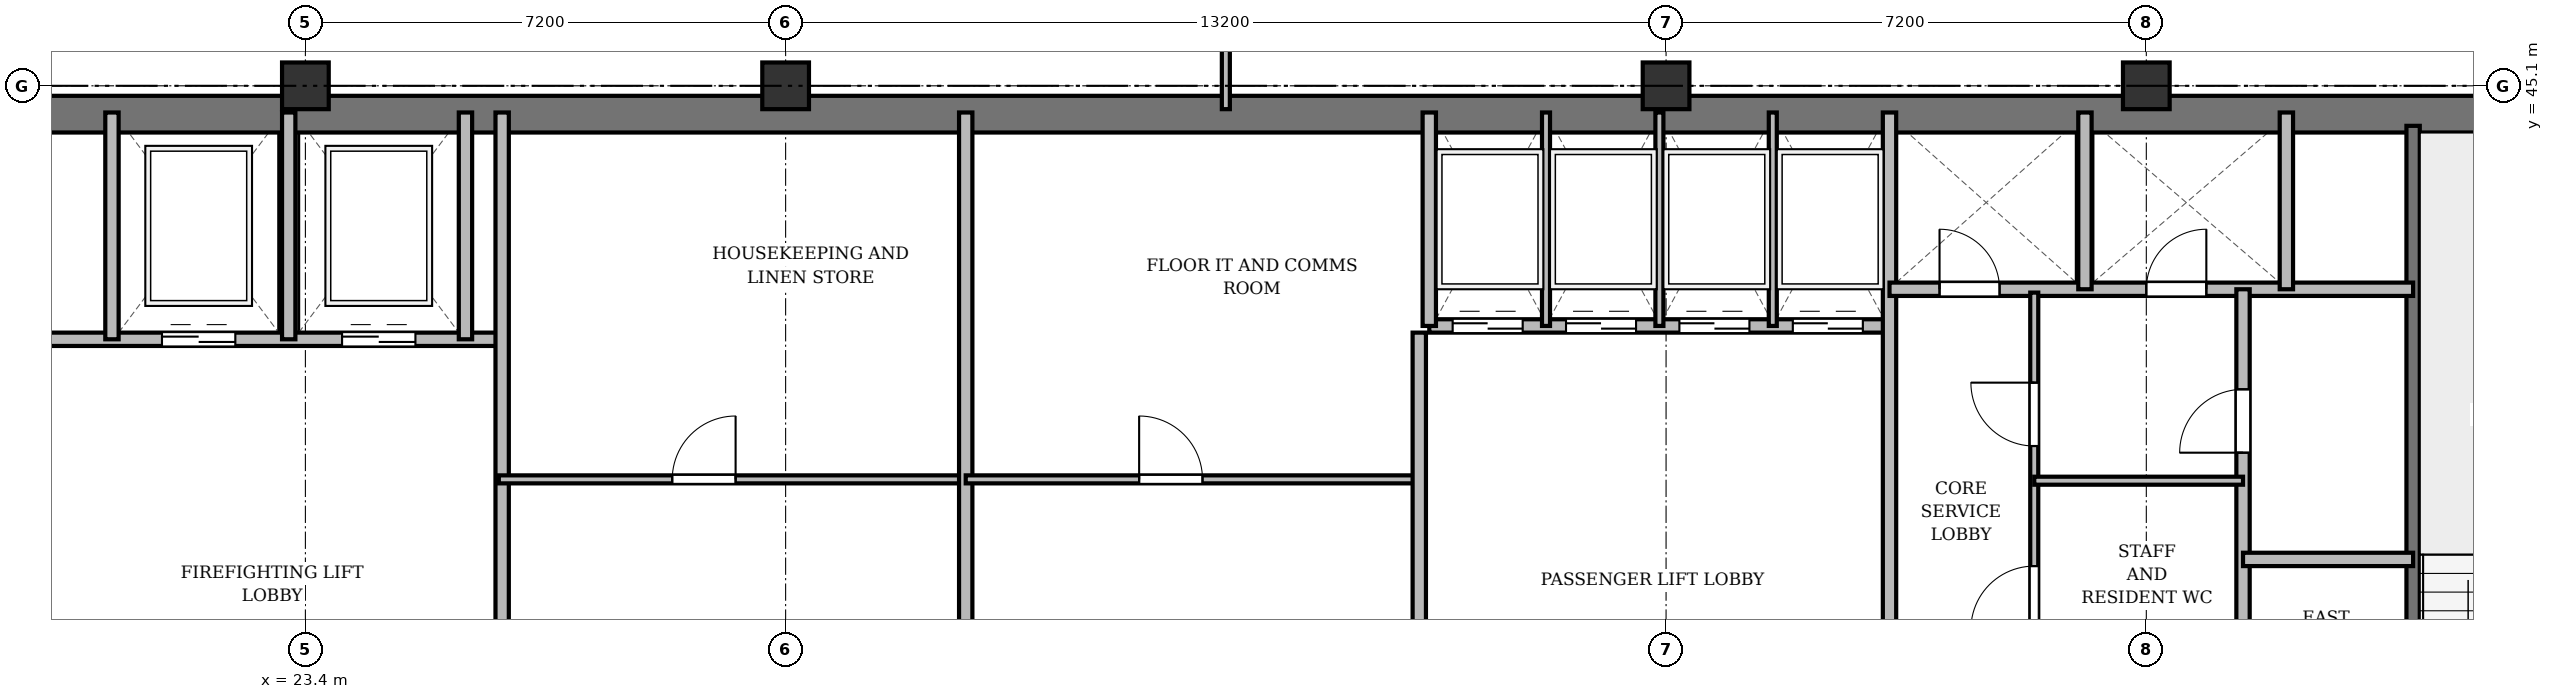
"""IFC4 building model, lengths in metres.
Left out: names, types, materials, properties, quantities, classifications, styles, units other than length and angle.
Written with IfcOpenShell. Run it as: python <this file> out.ifc"""

import sys

from ifc_helpers import new_model, si_unit, direction, frame, frame_2d, origin, origin_2d, place, context, subcontext, project, spatial, rectangle, extrude, source, transform, mapped, element, fill, save


model = new_model("IFC4")
c1 = context("Model", 3, precision=1e-05, world=origin(), true_north=direction((0.0, 1.0)))
c2 = subcontext(c1, "Body", "Model", "MODEL_VIEW")
j1 = project(units=[si_unit("LENGTHUNIT", "METRE"), si_unit("PLANEANGLEUNIT", "RADIAN")], contexts=[c1])
p1 = place(None, origin())
s1 = spatial("IfcSite", under=j1, at=p1, CompositionType="ELEMENT")
p2 = place(p1, origin())
s2 = spatial("IfcBuilding", under=s1, at=p2, CompositionType="ELEMENT")
p3 = place(p2, frame((0.0, 0.0, 222.9)))
s3 = spatial("IfcBuildingStorey", under=s2, at=p3, CompositionType="ELEMENT", Elevation=222.9)
m1 = source(origin(), c2, "Body", "SweptSolid", [
    extrude(rectangle(XDim=0.7, YDim=0.7, at=origin_2d()), origin(), (0.0, 0.0, 1.0), 3.6),
])
for number, where, z_axis, x_axis in (
    (1, (23.4, 45.1, 0.0), (0.0, 0.0, 1.0), (1.0, 0.0, 0.0)),
    (2, (30.6, 45.1, 0.0), (0.0, 0.0, 1.0), (1.0, 0.0, 0.0)),
    (3, (43.8, 45.1, 0.0), (0.0, 0.0, 1.0), (1.0, 0.0, 0.0)),
    (4, (51.0, 45.1, 0.0), (0.0, 0.0, 1.0), (1.0, 0.0, 0.0)),
):
    element("IfcColumn", number, at=place(p3, frame(where, z_axis=z_axis, x_axis=x_axis)), inside=s3, PredefinedType="COLUMN", context=c2, shape_type="MappedRepresentation", body=[
        mapped(m1, transform((0.0, 0.0, 0.0), x_axis=(1.0, 0.0, 0.0), y_axis=(0.0, 1.0, 0.0), z_axis=(0.0, 0.0, 1.0), scale=1.0)),
    ])
p4 = place(p3, frame((15.65, 44.675, 0.0), z_axis=(0.0, 0.0, 1.0), x_axis=(1.0, 0.0, 0.0)))
e5 = element("IfcWall", 5, at=p4, inside=s3, PredefinedType="SHEAR", context=c2, shape_type="SweptSolid", body=[
    extrude(rectangle(XDim=43.1, YDim=0.55, at=frame_2d((21.55, 0.0))), origin(), (0.0, 0.0, 1.0), 3.36),
])
p5 = place(p3, frame((55.0, 33.4, 0.0), z_axis=(0.0, 0.0, 1.0), x_axis=(0.0, 1.0, 0.0)))
e6 = element("IfcWall", 6, at=p5, inside=s3, PredefinedType="SHEAR", context=c2, shape_type="SweptSolid", body=[
    extrude(rectangle(XDim=11.1, YDim=0.2, at=frame_2d((5.55, 0.0))), origin(), (0.0, 0.0, 1.0), 3.36),
])
p6 = place(p5, frame((0.85, 0.0, 0.0)))
e7 = element("IfcOpeningElement", 7, at=p6, cuts=e6, PredefinedType="OPENING", context=c2, shape_type="SweptSolid", body=[
    extrude(rectangle(XDim=1.1, YDim=2.15, at=frame_2d((0.55, 1.075))), frame((0.0, 0.11, 0.0), z_axis=(0.0, -1.0, 0.0), x_axis=(1.0, 0.0, 0.0)), (0.0, 0.0, 1.0), 0.22),
])
p7 = place(p3, frame((19.55, 41.3, 0.0), z_axis=(0.0, 0.0, 1.0), x_axis=(1.0, 0.0, 0.0)))
e8 = element("IfcWall", 8, at=p7, inside=s3, PredefinedType="SOLIDWALL", context=c2, shape_type="SweptSolid", body=[
    extrude(rectangle(XDim=6.75, YDim=0.2, at=frame_2d((3.375, 0.0))), origin(), (0.0, 0.0, 1.0), 3.36),
])
p8 = place(p7, frame((1.7, 0.0, 0.0)))
e9 = element("IfcOpeningElement", 9, at=p8, cuts=e8, PredefinedType="OPENING", context=c2, shape_type="SweptSolid", body=[
    extrude(rectangle(XDim=1.1, YDim=2.15, at=frame_2d((0.55, 1.075))), frame((0.0, 0.11, 0.0), z_axis=(0.0, -1.0, 0.0), x_axis=(1.0, 0.0, 0.0)), (0.0, 0.0, 1.0), 0.22),
])
p9 = place(p7, frame((4.4, 0.0, 0.0)))
e10 = element("IfcOpeningElement", 10, at=p9, cuts=e8, PredefinedType="OPENING", context=c2, shape_type="SweptSolid", body=[
    extrude(rectangle(XDim=1.1, YDim=2.15, at=frame_2d((0.55, 1.075))), frame((0.0, 0.11, 0.0), z_axis=(0.0, -1.0, 0.0), x_axis=(1.0, 0.0, 0.0)), (0.0, 0.0, 1.0), 0.22),
])
for number, where, z_axis, x_axis in (
    (11, (20.5, 41.3, 0.0), (0.0, 0.0, 1.0), (0.0, 1.0, 0.0)),
    (12, (23.15, 41.3, 0.0), (0.0, 0.0, 1.0), (0.0, 1.0, 0.0)),
    (13, (25.8, 41.3, 0.0), (0.0, 0.0, 1.0), (0.0, 1.0, 0.0)),
):
    element("IfcWall", number, at=place(p3, frame(where, z_axis=z_axis, x_axis=x_axis)), inside=s3, PredefinedType="SOLIDWALL", context=c2, shape_type="SweptSolid", body=[
        extrude(rectangle(XDim=3.4, YDim=0.2, at=frame_2d((1.7, 0.0))), origin(), (0.0, 0.0, 1.0), 3.36),
    ])
p10 = place(p3, frame((26.35, 33.4, 0.0), z_axis=(0.0, 0.0, 1.0), x_axis=(0.0, 1.0, 0.0)))
e14 = element("IfcWall", 14, at=p10, inside=s3, PredefinedType="SOLIDWALL", context=c2, shape_type="SweptSolid", body=[
    extrude(rectangle(XDim=11.3, YDim=0.2, at=frame_2d((5.65, 0.0))), origin(), (0.0, 0.0, 1.0), 2.91),
])
p11 = place(p3, frame((26.3, 39.2, 0.0), z_axis=(0.0, 0.0, 1.0), x_axis=(1.0, 0.0, 0.0)))
e15 = element("IfcWall", 15, at=p11, inside=s3, PredefinedType="PARTITIONING", context=c2, shape_type="SweptSolid", body=[
    extrude(rectangle(XDim=7.0, YDim=0.12, at=frame_2d((3.5, 0.0))), origin(), (0.0, 0.0, 1.0), 2.86),
])
p12 = place(p11, frame((2.6, 0.0, 0.0)))
e16 = element("IfcOpeningElement", 16, at=p12, cuts=e15, PredefinedType="OPENING", context=c2, shape_type="SweptSolid", body=[
    extrude(rectangle(XDim=0.95, YDim=2.15, at=frame_2d((0.475, 1.075))), frame((0.0, 0.07, 0.0), z_axis=(0.0, -1.0, 0.0), x_axis=(1.0, 0.0, 0.0)), (0.0, 0.0, 1.0), 0.14),
])
p13 = place(p3, frame((33.3, 33.4, 0.0), z_axis=(0.0, 0.0, 1.0), x_axis=(0.0, 1.0, 0.0)))
e17 = element("IfcWall", 17, at=p13, inside=s3, PredefinedType="SOLIDWALL", context=c2, shape_type="SweptSolid", body=[
    extrude(rectangle(XDim=11.3, YDim=0.2, at=frame_2d((5.65, 0.0))), origin(), (0.0, 0.0, 1.0), 2.91),
])
p14 = place(p3, frame((33.3, 39.2, 0.0), z_axis=(0.0, 0.0, 1.0), x_axis=(1.0, 0.0, 0.0)))
e18 = element("IfcWall", 18, at=p14, inside=s3, PredefinedType="PARTITIONING", context=c2, shape_type="SweptSolid", body=[
    extrude(rectangle(XDim=6.8, YDim=0.12, at=frame_2d((3.4, 0.0))), origin(), (0.0, 0.0, 1.0), 3.36),
])
p15 = place(p14, frame((2.6, 0.0, 0.0)))
e19 = element("IfcOpeningElement", 19, at=p15, cuts=e18, PredefinedType="OPENING", context=c2, shape_type="SweptSolid", body=[
    extrude(rectangle(XDim=0.95, YDim=2.15, at=frame_2d((0.475, 1.075))), frame((0.0, 0.07, 0.0), z_axis=(0.0, -1.0, 0.0), x_axis=(1.0, 0.0, 0.0)), (0.0, 0.0, 1.0), 0.14),
])
p16 = place(p3, frame((40.1, 33.4, 0.0), z_axis=(0.0, 0.0, 1.0), x_axis=(0.0, 1.0, 0.0)))
e20 = element("IfcWall", 20, at=p16, inside=s3, PredefinedType="SOLIDWALL", context=c2, shape_type="SweptSolid", body=[
    extrude(rectangle(XDim=8.0, YDim=0.2, at=frame_2d((4.0, 0.0))), origin(), (0.0, 0.0, 1.0), 2.91),
])
p17 = place(p3, frame((40.25, 41.5, 0.0), z_axis=(0.0, 0.0, 1.0), x_axis=(1.0, 0.0, 0.0)))
e21 = element("IfcWall", 21, at=p17, inside=s3, PredefinedType="SOLIDWALL", context=c2, shape_type="SweptSolid", body=[
    extrude(rectangle(XDim=6.9, YDim=0.2, at=frame_2d((3.45, 0.0))), origin(), (0.0, 0.0, 1.0), 3.36),
])
p18 = place(p17, frame((0.35, 0.0, 0.0)))
e22 = element("IfcOpeningElement", 22, at=p18, cuts=e21, PredefinedType="OPENING", context=c2, shape_type="SweptSolid", body=[
    extrude(rectangle(XDim=1.05, YDim=2.15, at=frame_2d((0.525, 1.075))), frame((0.0, 0.11, 0.0), z_axis=(0.0, -1.0, 0.0), x_axis=(1.0, 0.0, 0.0)), (0.0, 0.0, 1.0), 0.22),
])
p19 = place(p17, frame((2.05, 0.0, 0.0)))
e23 = element("IfcOpeningElement", 23, at=p19, cuts=e21, PredefinedType="OPENING", context=c2, shape_type="SweptSolid", body=[
    extrude(rectangle(XDim=1.05, YDim=2.15, at=frame_2d((0.525, 1.075))), frame((0.0, 0.11, 0.0), z_axis=(0.0, -1.0, 0.0), x_axis=(1.0, 0.0, 0.0)), (0.0, 0.0, 1.0), 0.22),
])
p20 = place(p17, frame((3.75, 0.0, 0.0)))
e24 = element("IfcOpeningElement", 24, at=p20, cuts=e21, PredefinedType="OPENING", context=c2, shape_type="SweptSolid", body=[
    extrude(rectangle(XDim=1.05, YDim=2.15, at=frame_2d((0.525, 1.075))), frame((0.0, 0.11, 0.0), z_axis=(0.0, -1.0, 0.0), x_axis=(1.0, 0.0, 0.0)), (0.0, 0.0, 1.0), 0.22),
])
p21 = place(p17, frame((5.45, 0.0, 0.0)))
e25 = element("IfcOpeningElement", 25, at=p21, cuts=e21, PredefinedType="OPENING", context=c2, shape_type="SweptSolid", body=[
    extrude(rectangle(XDim=1.05, YDim=2.15, at=frame_2d((0.525, 1.075))), frame((0.0, 0.11, 0.0), z_axis=(0.0, -1.0, 0.0), x_axis=(1.0, 0.0, 0.0)), (0.0, 0.0, 1.0), 0.22),
])
p22 = place(p3, frame((40.25, 41.5, 0.0), z_axis=(0.0, 0.0, 1.0), x_axis=(0.0, 1.0, 0.0)))
e26 = element("IfcWall", 26, at=p22, inside=s3, PredefinedType="SOLIDWALL", context=c2, shape_type="SweptSolid", body=[
    extrude(rectangle(XDim=3.2, YDim=0.2, at=frame_2d((1.6, 0.0))), origin(), (0.0, 0.0, 1.0), 3.36),
])
for number, where, z_axis, x_axis in (
    (27, (42.0, 41.5, 0.0), (0.0, 0.0, 1.0), (0.0, 1.0, 0.0)),
    (28, (43.7, 41.5, 0.0), (0.0, 0.0, 1.0), (0.0, 1.0, 0.0)),
    (29, (45.4, 41.5, 0.0), (0.0, 0.0, 1.0), (0.0, 1.0, 0.0)),
):
    element("IfcWall", number, at=place(p3, frame(where, z_axis=z_axis, x_axis=x_axis)), inside=s3, PredefinedType="PARTITIONING", context=c2, shape_type="SweptSolid", body=[
        extrude(rectangle(XDim=3.2, YDim=0.12, at=frame_2d((1.6, 0.0))), origin(), (0.0, 0.0, 1.0), 3.36),
    ])
p23 = place(p3, frame((47.15, 33.4, 0.0), z_axis=(0.0, 0.0, 1.0), x_axis=(0.0, 1.0, 0.0)))
e30 = element("IfcWall", 30, at=p23, inside=s3, PredefinedType="SOLIDWALL", context=c2, shape_type="SweptSolid", body=[
    extrude(rectangle(XDim=11.3, YDim=0.2, at=frame_2d((5.65, 0.0))), origin(), (0.0, 0.0, 1.0), 2.91),
])
p24 = place(p3, frame((47.15, 42.05, 0.0), z_axis=(0.0, 0.0, 1.0), x_axis=(1.0, 0.0, 0.0)))
e31 = element("IfcWall", 31, at=p24, inside=s3, PredefinedType="SOLIDWALL", context=c2, shape_type="SweptSolid", body=[
    extrude(rectangle(XDim=7.85, YDim=0.2, at=frame_2d((3.925, 0.0))), origin(), (0.0, 0.0, 1.0), 2.86),
])
p25 = place(p24, frame((0.75, 0.0, 0.0)))
e32 = element("IfcOpeningElement", 32, at=p25, cuts=e31, PredefinedType="OPENING", context=c2, shape_type="SweptSolid", body=[
    extrude(rectangle(XDim=0.9, YDim=2.1, at=frame_2d((0.45, 1.05))), frame((0.0, 0.11, 0.0), z_axis=(0.0, -1.0, 0.0), x_axis=(1.0, 0.0, 0.0)), (0.0, 0.0, 1.0), 0.22),
])
p26 = place(p24, frame((3.85, 0.0, 0.0)))
e33 = element("IfcOpeningElement", 33, at=p26, cuts=e31, PredefinedType="OPENING", context=c2, shape_type="SweptSolid", body=[
    extrude(rectangle(XDim=0.9, YDim=2.1, at=frame_2d((0.45, 1.05))), frame((0.0, 0.11, 0.0), z_axis=(0.0, -1.0, 0.0), x_axis=(1.0, 0.0, 0.0)), (0.0, 0.0, 1.0), 0.22),
])
for number, where, z_axis, x_axis in (
    (34, (50.08, 42.05, 0.0), (0.0, 0.0, 1.0), (0.0, 1.0, 0.0)),
    (35, (53.1, 42.05, 0.0), (0.0, 0.0, 1.0), (0.0, 1.0, 0.0)),
):
    element("IfcWall", number, at=place(p3, frame(where, z_axis=z_axis, x_axis=x_axis)), inside=s3, PredefinedType="SOLIDWALL", context=c2, shape_type="SweptSolid", body=[
        extrude(rectangle(XDim=2.65, YDim=0.2, at=frame_2d((1.325, 0.0))), origin(), (0.0, 0.0, 1.0), 3.36),
    ])
p27 = place(p3, frame((52.45, 33.4, 0.0), z_axis=(0.0, 0.0, 1.0), x_axis=(0.0, 1.0, 0.0)))
e36 = element("IfcWall", 36, at=p27, inside=s3, PredefinedType="PARTITIONING", context=c2, shape_type="SweptSolid", body=[
    extrude(rectangle(XDim=8.65, YDim=0.2, at=frame_2d((4.325, 0.0))), origin(), (0.0, 0.0, 1.0), 2.91),
])
p28 = place(p27, frame((6.2, 0.0, 0.0)))
e37 = element("IfcOpeningElement", 37, at=p28, cuts=e36, PredefinedType="OPENING", context=c2, shape_type="SweptSolid", body=[
    extrude(rectangle(XDim=0.95, YDim=2.15, at=frame_2d((0.475, 1.075))), frame((0.0, 0.11, 0.0), z_axis=(0.0, -1.0, 0.0), x_axis=(1.0, 0.0, 0.0)), (0.0, 0.0, 1.0), 0.22),
])
p29 = place(p3, frame((52.45, 38.0, 0.0), z_axis=(0.0, 0.0, 1.0), x_axis=(1.0, 0.0, 0.0)))
e38 = element("IfcWall", 38, at=p29, inside=s3, PredefinedType="PARTITIONING", context=c2, shape_type="SweptSolid", body=[
    extrude(rectangle(XDim=2.55, YDim=0.2, at=frame_2d((1.275, 0.0))), origin(), (0.0, 0.0, 1.0), 3.36),
])
p30 = place(p3, frame((49.32, 33.4, 0.0), z_axis=(0.0, 0.0, 1.0), x_axis=(0.0, 1.0, 0.0)))
e39 = element("IfcWall", 39, at=p30, inside=s3, PredefinedType="PARTITIONING", context=c2, shape_type="SweptSolid", body=[
    extrude(rectangle(XDim=8.6, YDim=0.12, at=frame_2d((4.3, 0.0))), origin(), (0.0, 0.0, 1.0), 2.91),
])
p31 = place(p30, frame((0.85, 0.0, 0.0)))
e40 = element("IfcOpeningElement", 40, at=p31, cuts=e39, PredefinedType="OPENING", context=c2, shape_type="SweptSolid", body=[
    extrude(rectangle(XDim=0.95, YDim=2.15, at=frame_2d((0.475, 1.075))), frame((0.0, 0.07, 0.0), z_axis=(0.0, -1.0, 0.0), x_axis=(1.0, 0.0, 0.0)), (0.0, 0.0, 1.0), 0.14),
])
p32 = place(p30, frame((3.55, 0.0, 0.0)))
e41 = element("IfcOpeningElement", 41, at=p32, cuts=e39, PredefinedType="OPENING", context=c2, shape_type="SweptSolid", body=[
    extrude(rectangle(XDim=0.95, YDim=2.15, at=frame_2d((0.475, 1.075))), frame((0.0, 0.07, 0.0), z_axis=(0.0, -1.0, 0.0), x_axis=(1.0, 0.0, 0.0)), (0.0, 0.0, 1.0), 0.14),
])
p33 = place(p30, frame((6.3, 0.0, 0.0)))
e42 = element("IfcOpeningElement", 42, at=p33, cuts=e39, PredefinedType="OPENING", context=c2, shape_type="SweptSolid", body=[
    extrude(rectangle(XDim=0.95, YDim=2.15, at=frame_2d((0.475, 1.075))), frame((0.0, 0.07, 0.0), z_axis=(0.0, -1.0, 0.0), x_axis=(1.0, 0.0, 0.0)), (0.0, 0.0, 1.0), 0.14),
])
p34 = place(p3, frame((49.32, 39.18, 0.0), z_axis=(0.0, 0.0, 1.0), x_axis=(1.0, 0.0, 0.0)))
e43 = element("IfcWall", 43, at=p34, inside=s3, PredefinedType="PARTITIONING", context=c2, shape_type="SweptSolid", body=[
    extrude(rectangle(XDim=3.13, YDim=0.12, at=frame_2d((1.565, 0.0))), origin(), (0.0, 0.0, 1.0), 2.86),
])
p35 = place(p3, frame((37.2, 44.75, 0.0), z_axis=(0.0, 0.0, 1.0), x_axis=(0.0, 1.0, 0.0)))
e44 = element("IfcWall", 44, at=p35, inside=s3, PredefinedType="PARTITIONING", context=c2, shape_type="SweptSolid", body=[
    extrude(rectangle(XDim=3.61, YDim=0.12, at=frame_2d((1.805, 0.0))), origin(), (0.0, 0.0, 1.0), 2.91),
])
p36 = place(p35, frame((1.1, 0.0, 0.0)))
e45 = element("IfcOpeningElement", 45, at=p36, cuts=e44, PredefinedType="OPENING", context=c2, shape_type="SweptSolid", body=[
    extrude(rectangle(XDim=0.95, YDim=2.15, at=frame_2d((0.475, 1.075))), frame((0.0, 0.07, 0.0), z_axis=(0.0, -1.0, 0.0), x_axis=(1.0, 0.0, 0.0)), (0.0, 0.0, 1.0), 0.14),
])
m2 = source(origin(), c2, "Body", "SweptSolid", [
    extrude(rectangle(XDim=1.1, YDim=2.15, at=frame_2d((0.55, 1.075))), frame((0.0, 0.025, 0.0), z_axis=(0.0, -1.0, 0.0), x_axis=(1.0, 0.0, 0.0)), (0.0, 0.0, 1.0), 0.05),
])
p37 = place(p8, origin())
e46 = element("IfcDoor", 46, at=p37, inside=s3, OperationType="DOUBLE_DOOR_SLIDING", PredefinedType="DOOR", context=c2, shape_type="MappedRepresentation", body=[
    mapped(m2, transform((0.0, 0.0, 0.0), x_axis=(1.0, 0.0, 0.0), y_axis=(0.0, 1.0, 0.0), z_axis=(0.0, 0.0, 1.0), scale=1.0)),
])
fill(e9, e46)
p38 = place(p9, origin())
e47 = element("IfcDoor", 47, at=p38, inside=s3, OperationType="DOUBLE_DOOR_SLIDING", PredefinedType="DOOR", context=c2, shape_type="MappedRepresentation", body=[
    mapped(m2, transform((0.0, 0.0, 0.0), x_axis=(1.0, 0.0, 0.0), y_axis=(0.0, 1.0, 0.0), z_axis=(0.0, 0.0, 1.0), scale=1.0)),
])
fill(e10, e47)
m3 = source(origin(), c2, "Body", "SweptSolid", [
    extrude(rectangle(XDim=0.95, YDim=2.15, at=frame_2d((0.475, 1.075))), frame((0.0, 0.025, 0.0), z_axis=(0.0, -1.0, 0.0), x_axis=(1.0, 0.0, 0.0)), (0.0, 0.0, 1.0), 0.05),
])
p39 = place(p12, origin())
e48 = element("IfcDoor", 48, at=p39, inside=s3, OperationType="SINGLE_SWING_RIGHT", PredefinedType="DOOR", context=c2, shape_type="MappedRepresentation", body=[
    mapped(m3, transform((0.0, 0.0, 0.0), x_axis=(1.0, 0.0, 0.0), y_axis=(0.0, 1.0, 0.0), z_axis=(0.0, 0.0, 1.0), scale=1.0)),
])
fill(e16, e48)
p40 = place(p15, origin())
e49 = element("IfcDoor", 49, at=p40, inside=s3, OperationType="SINGLE_SWING_LEFT", PredefinedType="DOOR", context=c2, shape_type="MappedRepresentation", body=[
    mapped(m3, transform((0.0, 0.0, 0.0), x_axis=(1.0, 0.0, 0.0), y_axis=(0.0, 1.0, 0.0), z_axis=(0.0, 0.0, 1.0), scale=1.0)),
])
fill(e19, e49)
m4 = source(origin(), c2, "Body", "SweptSolid", [
    extrude(rectangle(XDim=1.05, YDim=2.15, at=frame_2d((0.525, 1.075))), frame((0.0, 0.025, 0.0), z_axis=(0.0, -1.0, 0.0), x_axis=(1.0, 0.0, 0.0)), (0.0, 0.0, 1.0), 0.05),
])
p41 = place(p18, origin())
e50 = element("IfcDoor", 50, at=p41, inside=s3, OperationType="DOUBLE_DOOR_SLIDING", PredefinedType="DOOR", context=c2, shape_type="MappedRepresentation", body=[
    mapped(m4, transform((0.0, 0.0, 0.0), x_axis=(1.0, 0.0, 0.0), y_axis=(0.0, 1.0, 0.0), z_axis=(0.0, 0.0, 1.0), scale=1.0)),
])
fill(e22, e50)
p42 = place(p19, origin())
e51 = element("IfcDoor", 51, at=p42, inside=s3, OperationType="DOUBLE_DOOR_SLIDING", PredefinedType="DOOR", context=c2, shape_type="MappedRepresentation", body=[
    mapped(m4, transform((0.0, 0.0, 0.0), x_axis=(1.0, 0.0, 0.0), y_axis=(0.0, 1.0, 0.0), z_axis=(0.0, 0.0, 1.0), scale=1.0)),
])
fill(e23, e51)
p43 = place(p20, origin())
e52 = element("IfcDoor", 52, at=p43, inside=s3, OperationType="DOUBLE_DOOR_SLIDING", PredefinedType="DOOR", context=c2, shape_type="MappedRepresentation", body=[
    mapped(m4, transform((0.0, 0.0, 0.0), x_axis=(1.0, 0.0, 0.0), y_axis=(0.0, 1.0, 0.0), z_axis=(0.0, 0.0, 1.0), scale=1.0)),
])
fill(e24, e52)
p44 = place(p21, origin())
e53 = element("IfcDoor", 53, at=p44, inside=s3, OperationType="DOUBLE_DOOR_SLIDING", PredefinedType="DOOR", context=c2, shape_type="MappedRepresentation", body=[
    mapped(m4, transform((0.0, 0.0, 0.0), x_axis=(1.0, 0.0, 0.0), y_axis=(0.0, 1.0, 0.0), z_axis=(0.0, 0.0, 1.0), scale=1.0)),
])
fill(e25, e53)
m5 = source(origin(), c2, "Body", "SweptSolid", [
    extrude(rectangle(XDim=0.9, YDim=2.1, at=frame_2d((0.45, 1.05))), frame((0.0, 0.025, 0.0), z_axis=(0.0, -1.0, 0.0), x_axis=(1.0, 0.0, 0.0)), (0.0, 0.0, 1.0), 0.05),
])
p45 = place(p25, origin())
e54 = element("IfcDoor", 54, at=p45, inside=s3, OperationType="SINGLE_SWING_LEFT", PredefinedType="DOOR", context=c2, shape_type="MappedRepresentation", body=[
    mapped(m5, transform((0.0, 0.0, 0.0), x_axis=(1.0, 0.0, 0.0), y_axis=(0.0, 1.0, 0.0), z_axis=(0.0, 0.0, 1.0), scale=1.0)),
])
fill(e32, e54)
p46 = place(p26, origin())
e55 = element("IfcDoor", 55, at=p46, inside=s3, OperationType="SINGLE_SWING_RIGHT", PredefinedType="DOOR", context=c2, shape_type="MappedRepresentation", body=[
    mapped(m5, transform((0.0, 0.0, 0.0), x_axis=(1.0, 0.0, 0.0), y_axis=(0.0, 1.0, 0.0), z_axis=(0.0, 0.0, 1.0), scale=1.0)),
])
fill(e33, e55)
p47 = place(p28, origin())
e56 = element("IfcDoor", 56, at=p47, inside=s3, OperationType="SINGLE_SWING_LEFT", PredefinedType="DOOR", context=c2, shape_type="MappedRepresentation", body=[
    mapped(m3, transform((0.0, 0.0, 0.0), x_axis=(1.0, 0.0, 0.0), y_axis=(0.0, 1.0, 0.0), z_axis=(0.0, 0.0, 1.0), scale=1.0)),
])
fill(e37, e56)
p48 = place(p32, origin())
e57 = element("IfcDoor", 57, at=p48, inside=s3, OperationType="SINGLE_SWING_LEFT", PredefinedType="DOOR", context=c2, shape_type="MappedRepresentation", body=[
    mapped(m3, transform((0.0, 0.0, 0.0), x_axis=(1.0, 0.0, 0.0), y_axis=(0.0, 1.0, 0.0), z_axis=(0.0, 0.0, 1.0), scale=1.0)),
])
fill(e41, e57)
p49 = place(p33, origin())
e58 = element("IfcDoor", 58, at=p49, inside=s3, OperationType="SINGLE_SWING_RIGHT", PredefinedType="DOOR", context=c2, shape_type="MappedRepresentation", body=[
    mapped(m3, transform((0.0, 0.0, 0.0), x_axis=(1.0, 0.0, 0.0), y_axis=(0.0, 1.0, 0.0), z_axis=(0.0, 0.0, 1.0), scale=1.0)),
])
fill(e42, e58)
save(model, sys.argv[1])
